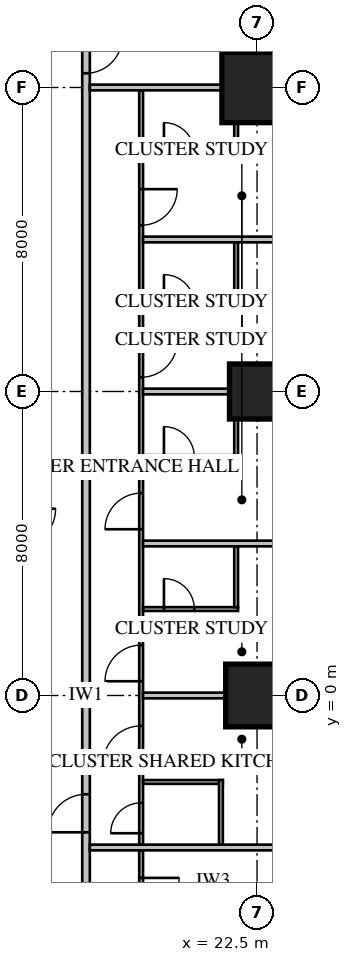
"""IFC4 building model, lengths in metres.
Left out: names, types, materials, properties, quantities, classifications, styles, units other than length and angle.
Written with IfcOpenShell. Run it as: python <this file> out.ifc"""

import sys

from ifc_helpers import new_model, si_unit, direction, frame, frame_2d, origin, origin_2d, place, context, subcontext, project, spatial, rectangle, extrude, element, fill, save


model = new_model("IFC4")
c1 = context("Model", 3, precision=1e-05, world=origin(), true_north=direction((0.0, 1.0)))
c2 = subcontext(c1, "Body", "Model", "MODEL_VIEW")
j1 = project(units=[si_unit("LENGTHUNIT", "METRE"), si_unit("PLANEANGLEUNIT", "RADIAN")], contexts=[c1])
p1 = place(None, origin())
s1 = spatial("IfcSite", under=j1, at=p1, CompositionType="ELEMENT")
p2 = place(p1, origin())
s2 = spatial("IfcBuilding", under=s1, at=p2, CompositionType="ELEMENT")
p3 = place(p2, frame((0.0, 0.0, 42.95)))
s3 = spatial("IfcBuildingStorey", under=s2, at=p3, CompositionType="ELEMENT", Elevation=42.95)
p4 = place(p3, frame((22.5, 0.0, 0.0), z_axis=(0.0, 0.0, 1.0), x_axis=(1.0, 0.0, 0.0)))
e1 = element("IfcColumn", 1, at=p4, inside=s3, PredefinedType="COLUMN", context=c2, shape_type="SweptSolid", body=[
    extrude(rectangle(XDim=1.65, YDim=1.65, at=origin_2d()), origin(), (0.0, 0.0, 1.0), 3.85),
])
p5 = place(p3, frame((22.5, 8.0, 0.0), z_axis=(0.0, 0.0, 1.0), x_axis=(1.0, 0.0, 0.0)))
e2 = element("IfcColumn", 2, at=p5, inside=s3, PredefinedType="COLUMN", context=c2, shape_type="SweptSolid", body=[
    extrude(rectangle(XDim=1.45, YDim=1.45, at=origin_2d()), origin(), (0.0, 0.0, 1.0), 3.85),
])
p6 = place(p3, frame((22.5, 16.0, 0.0), z_axis=(0.0, 0.0, 1.0), x_axis=(1.0, 0.0, 0.0)))
e3 = element("IfcColumn", 3, at=p6, inside=s3, PredefinedType="COLUMN", context=c2, shape_type="SweptSolid", body=[
    extrude(rectangle(XDim=1.85, YDim=1.85, at=origin_2d()), origin(), (0.0, 0.0, 1.0), 3.85),
])
p7 = place(p3, frame((18.0, -18.0, 0.0), z_axis=(0.0, 0.0, 1.0), x_axis=(0.0, 1.0, 0.0)))
e4 = element("IfcWall", 4, at=p7, inside=s3, PredefinedType="PARTITIONING", context=c2, shape_type="SweptSolid", body=[
    extrude(rectangle(XDim=36.0, YDim=0.2, at=frame_2d((18.0, 0.0))), origin(), (0.0, 0.0, 1.0), 3.65),
])
p8 = place(p7, frame((10.4, 0.0, 0.0)))
e5 = element("IfcOpeningElement", 5, at=p8, cuts=e4, PredefinedType="OPENING", context=c2, shape_type="SweptSolid", body=[
    extrude(rectangle(XDim=1.0, YDim=2.1, at=frame_2d((0.5, 1.05))), frame((0.0, 0.12, 0.0), z_axis=(0.0, -1.0, 0.0), x_axis=(1.0, 0.0, 0.0)), (0.0, 0.0, 1.0), 0.24),
])
p9 = place(p7, frame((14.4, 0.0, 0.0)))
e6 = element("IfcOpeningElement", 6, at=p9, cuts=e4, PredefinedType="OPENING", context=c2, shape_type="SweptSolid", body=[
    extrude(rectangle(XDim=1.0, YDim=2.1, at=frame_2d((0.5, 1.05))), frame((0.0, 0.12, 0.0), z_axis=(0.0, -1.0, 0.0), x_axis=(1.0, 0.0, 0.0)), (0.0, 0.0, 1.0), 0.24),
])
p10 = place(p7, frame((0.375, 0.0, 0.0)))
e7 = element("IfcOpeningElement", 7, at=p10, cuts=e4, PredefinedType="OPENING", context=c2, shape_type="SweptSolid", body=[
    extrude(rectangle(XDim=1.0, YDim=2.1, at=frame_2d((0.5, 1.05))), frame((0.0, 0.12, 0.0), z_axis=(0.0, -1.0, 0.0), x_axis=(1.0, 0.0, 0.0)), (0.0, 0.0, 1.0), 0.24),
])
p11 = place(p7, frame((34.375, 0.0, 0.0)))
e8 = element("IfcOpeningElement", 8, at=p11, cuts=e4, PredefinedType="OPENING", context=c2, shape_type="SweptSolid", body=[
    extrude(rectangle(XDim=0.95, YDim=2.1, at=frame_2d((0.475, 1.05))), frame((0.0, 0.12, 0.0), z_axis=(0.0, -1.0, 0.0), x_axis=(1.0, 0.0, 0.0)), (0.0, 0.0, 1.0), 0.24),
])
p12 = place(p3, frame((19.45, -15.925, 0.0), z_axis=(0.0, 0.0, 1.0), x_axis=(0.0, 1.0, 0.0)))
e9 = element("IfcWall", 9, at=p12, inside=s3, PredefinedType="PARTITIONING", context=c2, shape_type="SweptSolid", body=[
    extrude(rectangle(XDim=11.85, YDim=0.1, at=frame_2d((5.925, 0.0))), origin(), (0.0, 0.0, 1.0), 3.65),
])
p13 = place(p12, frame((10.125, 0.0, 0.0)))
e10 = element("IfcOpeningElement", 10, at=p13, cuts=e9, PredefinedType="OPENING", context=c2, shape_type="SweptSolid", body=[
    extrude(rectangle(XDim=1.0, YDim=2.1, at=frame_2d((0.5, 1.05))), frame((0.0, 0.07, 0.0), z_axis=(0.0, -1.0, 0.0), x_axis=(1.0, 0.0, 0.0)), (0.0, 0.0, 1.0), 0.14),
])
p14 = place(p12, frame((8.3, 0.0, 0.0)))
e11 = element("IfcOpeningElement", 11, at=p14, cuts=e9, PredefinedType="OPENING", context=c2, shape_type="SweptSolid", body=[
    extrude(rectangle(XDim=0.8, YDim=2.1, at=frame_2d((0.4, 1.05))), frame((0.0, 0.07, 0.0), z_axis=(0.0, -1.0, 0.0), x_axis=(1.0, 0.0, 0.0)), (0.0, 0.0, 1.0), 0.14),
])
p15 = place(p12, frame((0.3, 0.0, 0.0)))
e12 = element("IfcOpeningElement", 12, at=p15, cuts=e9, PredefinedType="OPENING", context=c2, shape_type="SweptSolid", body=[
    extrude(rectangle(XDim=0.95, YDim=2.1, at=frame_2d((0.475, 1.05))), frame((0.0, 0.07, 0.0), z_axis=(0.0, -1.0, 0.0), x_axis=(1.0, 0.0, 0.0)), (0.0, 0.0, 1.0), 0.14),
])
p16 = place(p12, frame((4.3, 0.0, 0.0)))
e13 = element("IfcOpeningElement", 13, at=p16, cuts=e9, PredefinedType="OPENING", context=c2, shape_type="SweptSolid", body=[
    extrude(rectangle(XDim=0.95, YDim=2.1, at=frame_2d((0.475, 1.05))), frame((0.0, 0.07, 0.0), z_axis=(0.0, -1.0, 0.0), x_axis=(1.0, 0.0, 0.0)), (0.0, 0.0, 1.0), 0.14),
])
p17 = place(p3, frame((19.45, -3.925, 0.0), z_axis=(0.0, 0.0, 1.0), x_axis=(0.0, 1.0, 0.0)))
e14 = element("IfcWall", 14, at=p17, inside=s3, PredefinedType="PARTITIONING", context=c2, shape_type="SweptSolid", body=[
    extrude(rectangle(XDim=19.85, YDim=0.1, at=frame_2d((9.925, 0.0))), origin(), (0.0, 0.0, 1.0), 3.65),
])
p18 = place(p17, frame((2.125, 0.0, 0.0)))
e15 = element("IfcOpeningElement", 15, at=p18, cuts=e14, PredefinedType="OPENING", context=c2, shape_type="SweptSolid", body=[
    extrude(rectangle(XDim=1.0, YDim=2.1, at=frame_2d((0.5, 1.05))), frame((0.0, 0.07, 0.0), z_axis=(0.0, -1.0, 0.0), x_axis=(1.0, 0.0, 0.0)), (0.0, 0.0, 1.0), 0.14),
])
p19 = place(p17, frame((0.3, 0.0, 0.0)))
e16 = element("IfcOpeningElement", 16, at=p19, cuts=e14, PredefinedType="OPENING", context=c2, shape_type="SweptSolid", body=[
    extrude(rectangle(XDim=0.8, YDim=2.1, at=frame_2d((0.4, 1.05))), frame((0.0, 0.07, 0.0), z_axis=(0.0, -1.0, 0.0), x_axis=(1.0, 0.0, 0.0)), (0.0, 0.0, 1.0), 0.14),
])
p20 = place(p17, frame((4.3, 0.0, 0.0)))
e17 = element("IfcOpeningElement", 17, at=p20, cuts=e14, PredefinedType="OPENING", context=c2, shape_type="SweptSolid", body=[
    extrude(rectangle(XDim=0.95, YDim=2.1, at=frame_2d((0.475, 1.05))), frame((0.0, 0.07, 0.0), z_axis=(0.0, -1.0, 0.0), x_axis=(1.0, 0.0, 0.0)), (0.0, 0.0, 1.0), 0.14),
])
p21 = place(p17, frame((8.3, 0.0, 0.0)))
e18 = element("IfcOpeningElement", 18, at=p21, cuts=e14, PredefinedType="OPENING", context=c2, shape_type="SweptSolid", body=[
    extrude(rectangle(XDim=0.95, YDim=2.1, at=frame_2d((0.475, 1.05))), frame((0.0, 0.07, 0.0), z_axis=(0.0, -1.0, 0.0), x_axis=(1.0, 0.0, 0.0)), (0.0, 0.0, 1.0), 0.14),
])
p22 = place(p17, frame((12.3, 0.0, 0.0)))
e19 = element("IfcOpeningElement", 19, at=p22, cuts=e14, PredefinedType="OPENING", context=c2, shape_type="SweptSolid", body=[
    extrude(rectangle(XDim=0.95, YDim=2.1, at=frame_2d((0.475, 1.05))), frame((0.0, 0.07, 0.0), z_axis=(0.0, -1.0, 0.0), x_axis=(1.0, 0.0, 0.0)), (0.0, 0.0, 1.0), 0.14),
])
p23 = place(p17, frame((16.3, 0.0, 0.0)))
e20 = element("IfcOpeningElement", 20, at=p23, cuts=e14, PredefinedType="OPENING", context=c2, shape_type="SweptSolid", body=[
    extrude(rectangle(XDim=0.95, YDim=2.1, at=frame_2d((0.475, 1.05))), frame((0.0, 0.07, 0.0), z_axis=(0.0, -1.0, 0.0), x_axis=(1.0, 0.0, 0.0)), (0.0, 0.0, 1.0), 0.14),
])
p24 = place(p3, frame((19.5, -2.275, 0.0), z_axis=(0.0, 0.0, 1.0), x_axis=(1.0, 0.0, 0.0)))
e21 = element("IfcWall", 21, at=p24, inside=s3, PredefinedType="PARTITIONING", context=c2, shape_type="SweptSolid", body=[
    extrude(rectangle(XDim=2.1, YDim=0.1, at=frame_2d((1.05, 0.0))), origin(), (0.0, 0.0, 1.0), 3.65),
])
p25 = place(p3, frame((21.55, -3.925, 0.0), z_axis=(0.0, 0.0, 1.0), x_axis=(0.0, 1.0, 0.0)))
e22 = element("IfcWall", 22, at=p25, inside=s3, PredefinedType="PARTITIONING", context=c2, shape_type="SweptSolid", body=[
    extrude(rectangle(XDim=1.7, YDim=0.1, at=frame_2d((0.85, 0.0))), origin(), (0.0, 0.0, 1.0), 3.65),
])
p26 = place(p3, frame((18.1, -4.0, 0.0), z_axis=(0.0, 0.0, 1.0), x_axis=(1.0, 0.0, 0.0)))
e23 = element("IfcWall", 23, at=p26, inside=s3, PredefinedType="PARTITIONING", context=c2, shape_type="SweptSolid", body=[
    extrude(rectangle(XDim=6.6, YDim=0.15, at=frame_2d((3.3, 0.0))), origin(), (0.0, 0.0, 1.0), 3.65),
])
p27 = place(p3, frame((19.5, 0.0, 0.0), z_axis=(0.0, 0.0, 1.0), x_axis=(1.0, 0.0, 0.0)))
e24 = element("IfcWall", 24, at=p27, inside=s3, PredefinedType="PARTITIONING", context=c2, shape_type="SweptSolid", body=[
    extrude(rectangle(XDim=5.2, YDim=0.15, at=frame_2d((2.6, 0.0))), origin(), (0.0, 0.0, 1.0), 2.957),
])
for number, where, z_axis, x_axis in (
    (25, (19.5, 4.0, 0.0), (0.0, 0.0, 1.0), (1.0, 0.0, 0.0)),
    (26, (19.5, 8.0, 0.0), (0.0, 0.0, 1.0), (1.0, 0.0, 0.0)),
    (27, (19.5, 12.0, 0.0), (0.0, 0.0, 1.0), (1.0, 0.0, 0.0)),
):
    element("IfcWall", number, at=place(p3, frame(where, z_axis=z_axis, x_axis=x_axis)), inside=s3, PredefinedType="PARTITIONING", context=c2, shape_type="SweptSolid", body=[
        extrude(rectangle(XDim=5.2, YDim=0.15, at=frame_2d((2.6, 0.0))), origin(), (0.0, 0.0, 1.0), 3.65),
    ])
p28 = place(p3, frame((18.1, 16.0, 0.0), z_axis=(0.0, 0.0, 1.0), x_axis=(1.0, 0.0, 0.0)))
e28 = element("IfcWall", 28, at=p28, inside=s3, PredefinedType="PARTITIONING", context=c2, shape_type="SweptSolid", body=[
    extrude(rectangle(XDim=6.589, YDim=0.15, at=frame_2d((3.295, 0.0))), origin(), (0.0, 0.0, 1.0), 3.65),
])
p29 = place(p3, frame((19.5, 2.275, 0.0), z_axis=(0.0, 0.0, 1.0), x_axis=(1.0, 0.0, 0.0)))
e29 = element("IfcWall", 29, at=p29, inside=s3, PredefinedType="PARTITIONING", context=c2, shape_type="SweptSolid", body=[
    extrude(rectangle(XDim=2.5, YDim=0.1, at=frame_2d((1.25, 0.0))), origin(), (0.0, 0.0, 1.0), 3.65),
])
p30 = place(p29, frame((0.55, 0.0, 0.0)))
e30 = element("IfcOpeningElement", 30, at=p30, cuts=e29, PredefinedType="OPENING", context=c2, shape_type="SweptSolid", body=[
    extrude(rectangle(XDim=0.8, YDim=2.1, at=frame_2d((0.4, 1.05))), frame((0.0, 0.07, 0.0), z_axis=(0.0, -1.0, 0.0), x_axis=(1.0, 0.0, 0.0)), (0.0, 0.0, 1.0), 0.14),
])
p31 = place(p3, frame((21.95, 2.325, 0.0), z_axis=(0.0, 0.0, 1.0), x_axis=(0.0, 1.0, 0.0)))
e31 = element("IfcWall", 31, at=p31, inside=s3, PredefinedType="PARTITIONING", context=c2, shape_type="SweptSolid", body=[
    extrude(rectangle(XDim=1.6, YDim=0.1, at=frame_2d((0.8, 0.0))), origin(), (0.0, 0.0, 1.0), 3.65),
])
p32 = place(p3, frame((19.5, 6.275, 0.0), z_axis=(0.0, 0.0, 1.0), x_axis=(1.0, 0.0, 0.0)))
e32 = element("IfcWall", 32, at=p32, inside=s3, PredefinedType="PARTITIONING", context=c2, shape_type="SweptSolid", body=[
    extrude(rectangle(XDim=2.5, YDim=0.1, at=frame_2d((1.25, 0.0))), origin(), (0.0, 0.0, 1.0), 3.65),
])
p33 = place(p32, frame((0.55, 0.0, 0.0)))
e33 = element("IfcOpeningElement", 33, at=p33, cuts=e32, PredefinedType="OPENING", context=c2, shape_type="SweptSolid", body=[
    extrude(rectangle(XDim=0.8, YDim=2.1, at=frame_2d((0.4, 1.05))), frame((0.0, 0.07, 0.0), z_axis=(0.0, -1.0, 0.0), x_axis=(1.0, 0.0, 0.0)), (0.0, 0.0, 1.0), 0.14),
])
p34 = place(p3, frame((21.95, 6.325, 0.0), z_axis=(0.0, 0.0, 1.0), x_axis=(0.0, 1.0, 0.0)))
e34 = element("IfcWall", 34, at=p34, inside=s3, PredefinedType="PARTITIONING", context=c2, shape_type="SweptSolid", body=[
    extrude(rectangle(XDim=1.6, YDim=0.1, at=frame_2d((0.8, 0.0))), origin(), (0.0, 0.0, 1.0), 3.65),
])
p35 = place(p3, frame((19.5, 10.275, 0.0), z_axis=(0.0, 0.0, 1.0), x_axis=(1.0, 0.0, 0.0)))
e35 = element("IfcWall", 35, at=p35, inside=s3, PredefinedType="PARTITIONING", context=c2, shape_type="SweptSolid", body=[
    extrude(rectangle(XDim=2.5, YDim=0.1, at=frame_2d((1.25, 0.0))), origin(), (0.0, 0.0, 1.0), 3.65),
])
p36 = place(p35, frame((0.55, 0.0, 0.0)))
e36 = element("IfcOpeningElement", 36, at=p36, cuts=e35, PredefinedType="OPENING", context=c2, shape_type="SweptSolid", body=[
    extrude(rectangle(XDim=0.8, YDim=2.1, at=frame_2d((0.4, 1.05))), frame((0.0, 0.07, 0.0), z_axis=(0.0, -1.0, 0.0), x_axis=(1.0, 0.0, 0.0)), (0.0, 0.0, 1.0), 0.14),
])
p37 = place(p3, frame((21.95, 10.325, 0.0), z_axis=(0.0, 0.0, 1.0), x_axis=(0.0, 1.0, 0.0)))
e37 = element("IfcWall", 37, at=p37, inside=s3, PredefinedType="PARTITIONING", context=c2, shape_type="SweptSolid", body=[
    extrude(rectangle(XDim=1.6, YDim=0.1, at=frame_2d((0.8, 0.0))), origin(), (0.0, 0.0, 1.0), 3.65),
])
p38 = place(p3, frame((19.5, 14.275, 0.0), z_axis=(0.0, 0.0, 1.0), x_axis=(1.0, 0.0, 0.0)))
e38 = element("IfcWall", 38, at=p38, inside=s3, PredefinedType="PARTITIONING", context=c2, shape_type="SweptSolid", body=[
    extrude(rectangle(XDim=2.5, YDim=0.1, at=frame_2d((1.25, 0.0))), origin(), (0.0, 0.0, 1.0), 3.65),
])
p39 = place(p38, frame((0.55, 0.0, 0.0)))
e39 = element("IfcOpeningElement", 39, at=p39, cuts=e38, PredefinedType="OPENING", context=c2, shape_type="SweptSolid", body=[
    extrude(rectangle(XDim=0.8, YDim=2.1, at=frame_2d((0.4, 1.05))), frame((0.0, 0.07, 0.0), z_axis=(0.0, -1.0, 0.0), x_axis=(1.0, 0.0, 0.0)), (0.0, 0.0, 1.0), 0.14),
])
p40 = place(p3, frame((21.95, 14.325, 0.0), z_axis=(0.0, 0.0, 1.0), x_axis=(0.0, 1.0, 0.0)))
e40 = element("IfcWall", 40, at=p40, inside=s3, PredefinedType="PARTITIONING", context=c2, shape_type="SweptSolid", body=[
    extrude(rectangle(XDim=1.6, YDim=0.1, at=frame_2d((0.8, 0.0))), origin(), (0.0, 0.0, 1.0), 3.65),
])
p41 = place(p13, origin())
e41 = element("IfcDoor", 41, at=p41, inside=s3, OperationType="SINGLE_SWING_RIGHT", PredefinedType="DOOR", context=c2, shape_type="SweptSolid", body=[
    extrude(rectangle(XDim=1.0, YDim=2.1, at=frame_2d((0.5, 1.05))), frame((0.0, 0.025, 0.0), z_axis=(0.0, -1.0, 0.0), x_axis=(1.0, 0.0, 0.0)), (0.0, 0.0, 1.0), 0.05),
])
fill(e10, e41)
p42 = place(p9, origin())
e42 = element("IfcDoor", 42, at=p42, inside=s3, OperationType="SINGLE_SWING_LEFT", PredefinedType="DOOR", context=c2, shape_type="SweptSolid", body=[
    extrude(rectangle(XDim=1.0, YDim=2.1, at=frame_2d((0.5, 1.05))), frame((0.0, 0.025, 0.0), z_axis=(0.0, -1.0, 0.0), x_axis=(1.0, 0.0, 0.0)), (0.0, 0.0, 1.0), 0.05),
])
fill(e6, e42)
p43 = place(p18, origin())
e43 = element("IfcDoor", 43, at=p43, inside=s3, OperationType="SINGLE_SWING_LEFT", PredefinedType="DOOR", context=c2, shape_type="SweptSolid", body=[
    extrude(rectangle(XDim=1.0, YDim=2.1, at=frame_2d((0.5, 1.05))), frame((0.0, 0.025, 0.0), z_axis=(0.0, -1.0, 0.0), x_axis=(1.0, 0.0, 0.0)), (0.0, 0.0, 1.0), 0.05),
])
fill(e15, e43)
p44 = place(p19, origin())
e44 = element("IfcDoor", 44, at=p44, inside=s3, OperationType="SINGLE_SWING_LEFT", PredefinedType="DOOR", context=c2, shape_type="SweptSolid", body=[
    extrude(rectangle(XDim=0.8, YDim=2.1, at=frame_2d((0.4, 1.05))), frame((0.0, 0.025, 0.0), z_axis=(0.0, -1.0, 0.0), x_axis=(1.0, 0.0, 0.0)), (0.0, 0.0, 1.0), 0.05),
])
fill(e16, e44)
p45 = place(p20, origin())
e45 = element("IfcDoor", 45, at=p45, inside=s3, OperationType="SINGLE_SWING_LEFT", PredefinedType="DOOR", context=c2, shape_type="SweptSolid", body=[
    extrude(rectangle(XDim=0.95, YDim=2.1, at=frame_2d((0.475, 1.05))), frame((0.0, 0.025, 0.0), z_axis=(0.0, -1.0, 0.0), x_axis=(1.0, 0.0, 0.0)), (0.0, 0.0, 1.0), 0.05),
])
fill(e17, e45)
p46 = place(p30, origin())
e46 = element("IfcDoor", 46, at=p46, inside=s3, OperationType="SINGLE_SWING_LEFT", PredefinedType="DOOR", context=c2, shape_type="SweptSolid", body=[
    extrude(rectangle(XDim=0.8, YDim=2.1, at=frame_2d((0.4, 1.05))), frame((0.0, 0.025, 0.0), z_axis=(0.0, -1.0, 0.0), x_axis=(1.0, 0.0, 0.0)), (0.0, 0.0, 1.0), 0.05),
])
fill(e30, e46)
p47 = place(p21, origin())
e47 = element("IfcDoor", 47, at=p47, inside=s3, OperationType="SINGLE_SWING_LEFT", PredefinedType="DOOR", context=c2, shape_type="SweptSolid", body=[
    extrude(rectangle(XDim=0.95, YDim=2.1, at=frame_2d((0.475, 1.05))), frame((0.0, 0.025, 0.0), z_axis=(0.0, -1.0, 0.0), x_axis=(1.0, 0.0, 0.0)), (0.0, 0.0, 1.0), 0.05),
])
fill(e18, e47)
p48 = place(p33, origin())
e48 = element("IfcDoor", 48, at=p48, inside=s3, OperationType="SINGLE_SWING_LEFT", PredefinedType="DOOR", context=c2, shape_type="SweptSolid", body=[
    extrude(rectangle(XDim=0.8, YDim=2.1, at=frame_2d((0.4, 1.05))), frame((0.0, 0.025, 0.0), z_axis=(0.0, -1.0, 0.0), x_axis=(1.0, 0.0, 0.0)), (0.0, 0.0, 1.0), 0.05),
])
fill(e33, e48)
p49 = place(p22, origin())
e49 = element("IfcDoor", 49, at=p49, inside=s3, OperationType="SINGLE_SWING_RIGHT", PredefinedType="DOOR", context=c2, shape_type="SweptSolid", body=[
    extrude(rectangle(XDim=0.95, YDim=2.1, at=frame_2d((0.475, 1.05))), frame((0.0, 0.025, 0.0), z_axis=(0.0, -1.0, 0.0), x_axis=(1.0, 0.0, 0.0)), (0.0, 0.0, 1.0), 0.05),
])
fill(e19, e49)
p50 = place(p36, origin())
e50 = element("IfcDoor", 50, at=p50, inside=s3, OperationType="SINGLE_SWING_LEFT", PredefinedType="DOOR", context=c2, shape_type="SweptSolid", body=[
    extrude(rectangle(XDim=0.8, YDim=2.1, at=frame_2d((0.4, 1.05))), frame((0.0, 0.025, 0.0), z_axis=(0.0, -1.0, 0.0), x_axis=(1.0, 0.0, 0.0)), (0.0, 0.0, 1.0), 0.05),
])
fill(e36, e50)
p51 = place(p23, origin())
e51 = element("IfcDoor", 51, at=p51, inside=s3, OperationType="SINGLE_SWING_RIGHT", PredefinedType="DOOR", context=c2, shape_type="SweptSolid", body=[
    extrude(rectangle(XDim=0.95, YDim=2.1, at=frame_2d((0.475, 1.05))), frame((0.0, 0.025, 0.0), z_axis=(0.0, -1.0, 0.0), x_axis=(1.0, 0.0, 0.0)), (0.0, 0.0, 1.0), 0.05),
])
fill(e20, e51)
p52 = place(p39, origin())
e52 = element("IfcDoor", 52, at=p52, inside=s3, OperationType="SINGLE_SWING_LEFT", PredefinedType="DOOR", context=c2, shape_type="SweptSolid", body=[
    extrude(rectangle(XDim=0.8, YDim=2.1, at=frame_2d((0.4, 1.05))), frame((0.0, 0.025, 0.0), z_axis=(0.0, -1.0, 0.0), x_axis=(1.0, 0.0, 0.0)), (0.0, 0.0, 1.0), 0.05),
])
fill(e39, e52)
p53 = place(p11, origin())
e53 = element("IfcDoor", 53, at=p53, inside=s3, OperationType="SINGLE_SWING_RIGHT", PredefinedType="DOOR", context=c2, shape_type="SweptSolid", body=[
    extrude(rectangle(XDim=0.95, YDim=2.1, at=frame_2d((0.475, 1.05))), frame((0.0, 0.025, 0.0), z_axis=(0.0, -1.0, 0.0), x_axis=(1.0, 0.0, 0.0)), (0.0, 0.0, 1.0), 0.05),
])
fill(e8, e53)
save(model, sys.argv[1])
